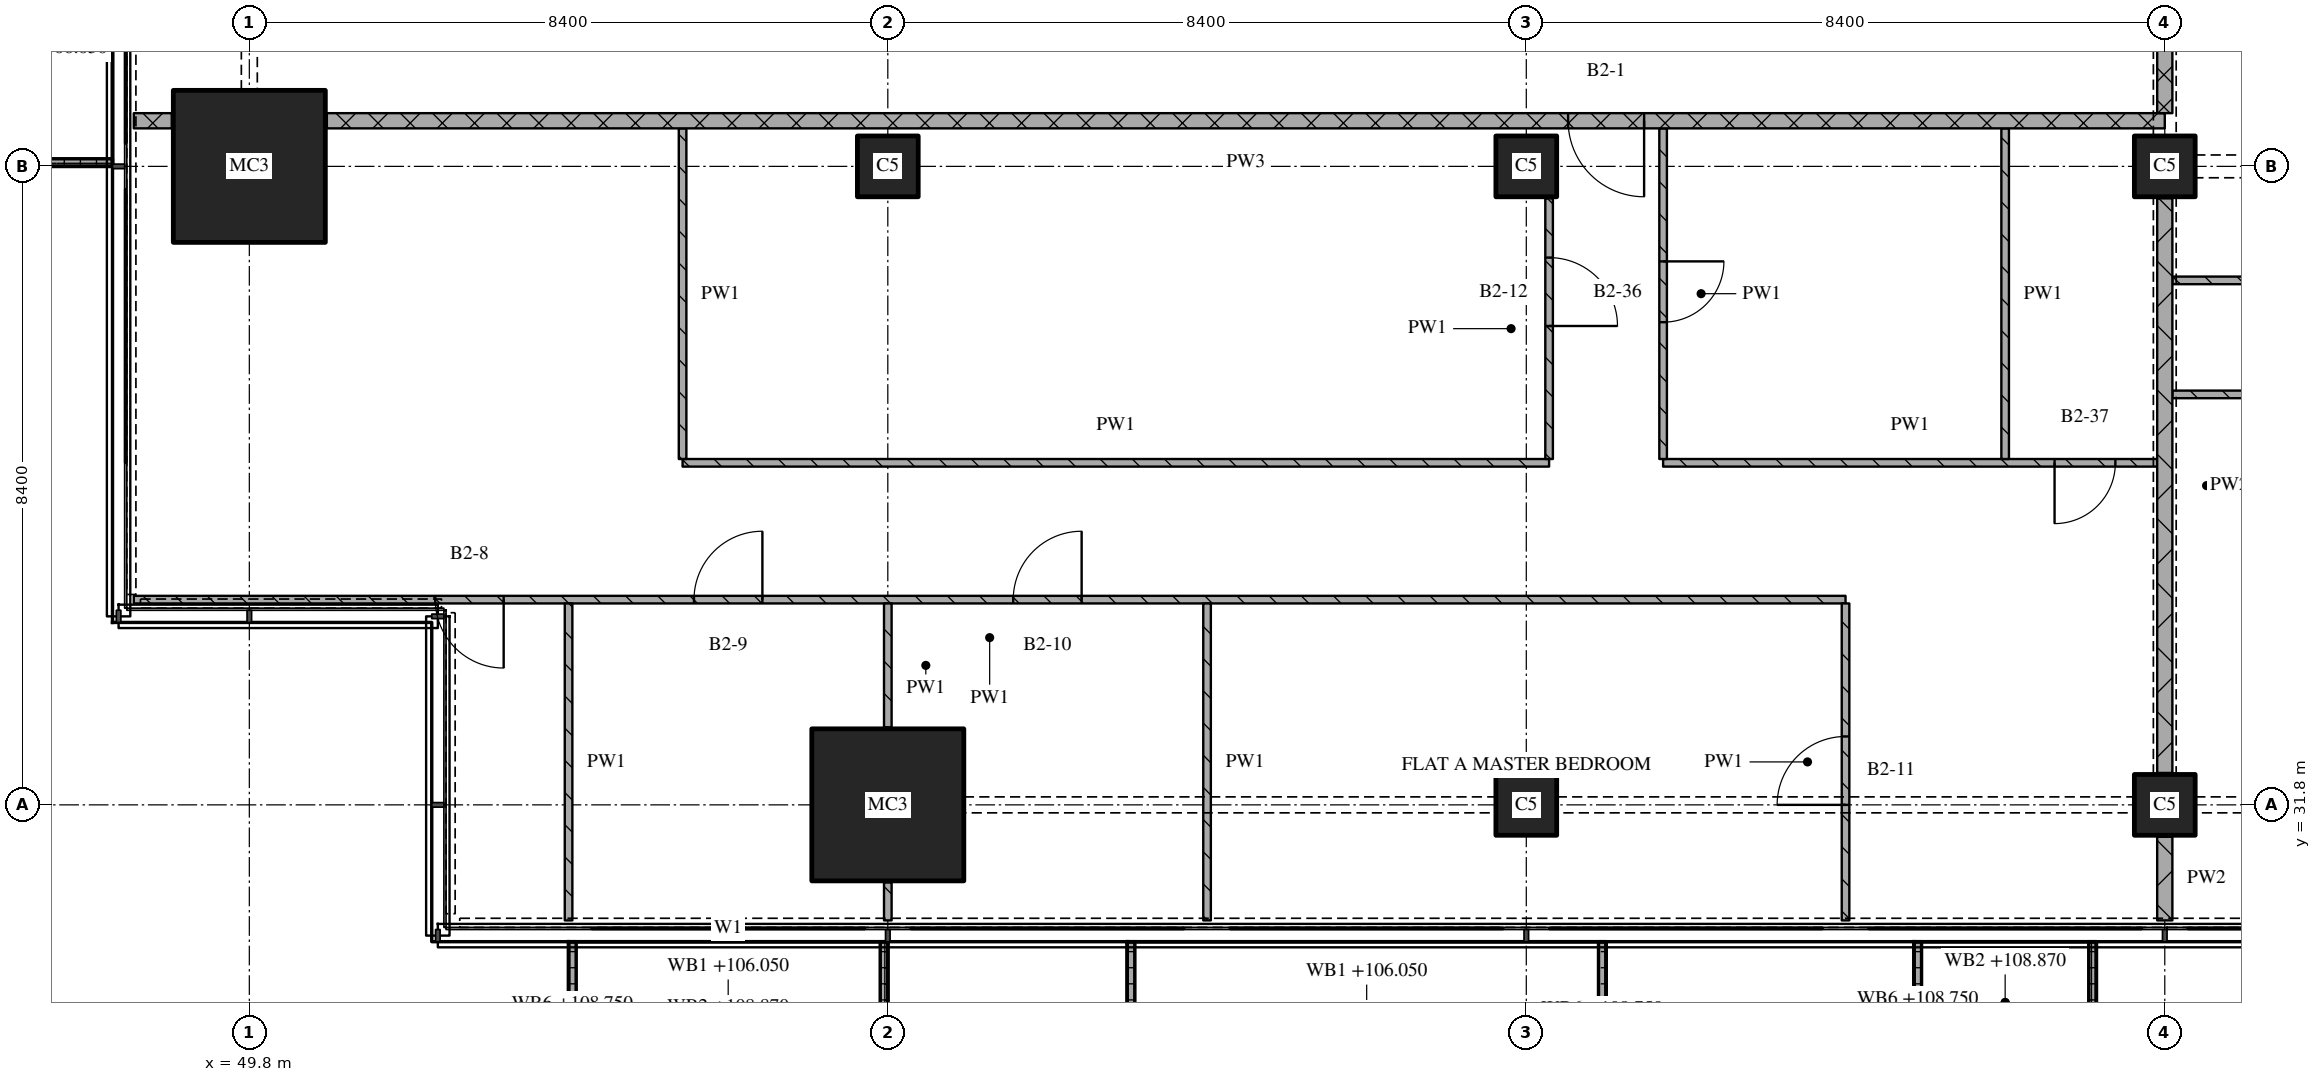
"""IFC4 building model, lengths in metres.
Left out: names, types, materials, properties, quantities, classifications, styles, units other than length and angle.
Written with IfcOpenShell. Run it as: python <this file> out.ifc"""

import sys

from ifc_helpers import new_model, si_unit, direction, frame, frame_2d, origin, origin_2d, place, context, subcontext, project, spatial, polyline, rectangle, outline, extrude, element, fill, save


model = new_model("IFC4")
c1 = context("Model", 3, precision=1e-05, world=origin(), true_north=direction((0.0, 1.0)))
c2 = subcontext(c1, "Body", "Model", "MODEL_VIEW")
j1 = project(units=[si_unit("LENGTHUNIT", "METRE"), si_unit("PLANEANGLEUNIT", "RADIAN")], contexts=[c1])
p1 = place(None, origin())
s1 = spatial("IfcSite", under=j1, at=p1, CompositionType="ELEMENT")
p2 = place(p1, origin())
s2 = spatial("IfcBuilding", under=s1, at=p2, CompositionType="ELEMENT")
p3 = place(p2, frame((0.0, 0.0, 106.05)))
s3 = spatial("IfcBuildingStorey", under=s2, at=p3, CompositionType="ELEMENT", Elevation=106.05)
for number, where, z_axis, x_axis in (
    (1, (49.8, 40.2, 0.0), (0.0, 0.0, 1.0), (1.0, 0.0, 0.0)),
    (2, (58.2, 31.8, 0.0), (0.0, 0.0, 1.0), (1.0, 0.0, 0.0)),
):
    element("IfcColumn", number, at=place(p3, frame(where, z_axis=z_axis, x_axis=x_axis)), inside=s3, PredefinedType="COLUMN", context=c2, shape_type="SweptSolid", body=[
        extrude(rectangle(XDim=2.0, YDim=2.0, at=origin_2d()), origin(), (0.0, 0.0, 1.0), 3.6),
    ])
for number, where, z_axis, x_axis in (
    (3, (58.2, 40.2, 0.0), (0.0, 0.0, 1.0), (1.0, 0.0, 0.0)),
    (4, (66.6, 31.8, 0.0), (0.0, 0.0, 1.0), (1.0, 0.0, 0.0)),
    (5, (66.6, 40.2, 0.0), (0.0, 0.0, 1.0), (1.0, 0.0, 0.0)),
    (6, (75.0, 31.8, 0.0), (0.0, 0.0, 1.0), (1.0, 0.0, 0.0)),
    (7, (75.0, 40.2, 0.0), (0.0, 0.0, 1.0), (1.0, 0.0, 0.0)),
):
    element("IfcColumn", number, at=place(p3, frame(where, z_axis=z_axis, x_axis=x_axis)), inside=s3, PredefinedType="COLUMN", context=c2, shape_type="SweptSolid", body=[
        extrude(rectangle(XDim=0.8, YDim=0.8, at=origin_2d()), origin(), (0.0, 0.0, 1.0), 3.6),
    ])
p4 = place(p3, origin())
e8 = element("IfcWall", 8, at=p4, inside=s3, PredefinedType="SOLIDWALL", context=c2, shape_type="SweptSolid", body=[
    extrude(outline(polyline([(54.0, 30.0), (54.1, 30.0), (54.1, 28.367), (58.1, 28.367), (58.1, 30.0), (58.2, 30.0), (58.2, 28.267), (54.0, 28.267), (54.0, 30.0)])), origin(), (0.0, 0.0, 1.0), 1.0),
])
p5 = place(p3, origin())
e9 = element("IfcWall", 9, at=p5, inside=s3, PredefinedType="SOLIDWALL", context=c2, shape_type="SweptSolid", body=[
    extrude(outline(polyline([(61.35, 30.0), (61.45, 30.0), (61.45, 28.233), (67.55, 28.233), (67.55, 30.0), (67.65, 30.0), (67.65, 28.133), (61.35, 28.133), (61.35, 30.0)])), origin(), (0.0, 0.0, 1.0), 1.0),
])
p6 = place(p3, origin())
e10 = element("IfcWall", 10, at=p6, inside=s3, PredefinedType="SOLIDWALL", context=c2, shape_type="SweptSolid", body=[
    extrude(outline(polyline([(71.7, 30.0), (71.8, 30.0), (71.8, 28.5), (74.0, 28.5), (74.0, 30.0), (74.1, 30.0), (74.1, 28.4), (71.7, 28.4), (71.7, 30.0)])), origin(), (0.0, 0.0, 1.0), 1.0),
])
p7 = place(p3, origin())
e11 = element("IfcWall", 11, at=p7, inside=s3, PredefinedType="SOLIDWALL", context=c2, shape_type="SweptSolid", body=[
    extrude(outline(polyline([(48.0, 44.4), (48.0, 44.3), (46.367, 44.3), (46.367, 40.3), (48.0, 40.3), (48.0, 40.2), (46.267, 40.2), (46.267, 44.4), (48.0, 44.4)])), origin(), (0.0, 0.0, 1.0), 1.0),
])
p8 = place(p3, frame((70.8, 34.5, 0.0), z_axis=(0.0, 0.0, 1.0), x_axis=(-1.0, 0.0, 0.0)))
e12 = element("IfcWall", 12, at=p8, inside=s3, PredefinedType="PARTITIONING", context=c2, shape_type="SweptSolid", body=[
    extrude(rectangle(XDim=22.52, YDim=0.1, at=frame_2d((11.26, 0.0))), origin(), (0.0, 0.0, 1.0), 3.32),
])
p9 = place(p8, frame((10.05, 0.0, 0.0)))
e13 = element("IfcOpeningElement", 13, at=p9, cuts=e12, PredefinedType="OPENING", context=c2, shape_type="SweptSolid", body=[
    extrude(rectangle(XDim=0.9, YDim=2.1, at=frame_2d((0.45, 1.05))), frame((0.0, 0.06, 0.0), z_axis=(0.0, -1.0, 0.0), x_axis=(1.0, 0.0, 0.0)), (0.0, 0.0, 1.0), 0.12),
])
p10 = place(p8, frame((14.25, 0.0, 0.0)))
e14 = element("IfcOpeningElement", 14, at=p10, cuts=e12, PredefinedType="OPENING", context=c2, shape_type="SweptSolid", body=[
    extrude(rectangle(XDim=0.9, YDim=2.1, at=frame_2d((0.45, 1.05))), frame((0.0, 0.06, 0.0), z_axis=(0.0, -1.0, 0.0), x_axis=(1.0, 0.0, 0.0)), (0.0, 0.0, 1.0), 0.12),
])
p11 = place(p8, frame((17.654, 0.0, 0.0)))
e15 = element("IfcOpeningElement", 15, at=p11, cuts=e12, PredefinedType="OPENING", context=c2, shape_type="SweptSolid", body=[
    extrude(rectangle(XDim=0.9, YDim=2.1, at=frame_2d((0.45, 1.05))), frame((0.0, 0.06, 0.0), z_axis=(0.0, -1.0, 0.0), x_axis=(1.0, 0.0, 0.0)), (0.0, 0.0, 1.0), 0.12),
])
p12 = place(p3, frame((55.5, 36.3, 0.0), z_axis=(0.0, 0.0, 1.0), x_axis=(1.0, 0.0, 0.0)))
e16 = element("IfcWall", 16, at=p12, inside=s3, PredefinedType="PARTITIONING", context=c2, shape_type="SweptSolid", body=[
    extrude(rectangle(XDim=11.4, YDim=0.1, at=frame_2d((5.7, 0.0))), origin(), (0.0, 0.0, 1.0), 3.32),
])
p13 = place(p3, frame((68.4, 36.3, 0.0), z_axis=(0.0, 0.0, 1.0), x_axis=(1.0, 0.0, 0.0)))
e17 = element("IfcWall", 17, at=p13, inside=s3, PredefinedType="PARTITIONING", context=c2, shape_type="SweptSolid", body=[
    extrude(rectangle(XDim=6.5, YDim=0.1, at=frame_2d((3.25, 0.0))), origin(), (0.0, 0.0, 1.0), 3.32),
])
p14 = place(p13, frame((5.15, 0.0, 0.0)))
e18 = element("IfcOpeningElement", 18, at=p14, cuts=e17, PredefinedType="OPENING", context=c2, shape_type="SweptSolid", body=[
    extrude(rectangle(XDim=0.8, YDim=2.1, at=frame_2d((0.4, 1.05))), frame((0.0, 0.06, 0.0), z_axis=(0.0, -1.0, 0.0), x_axis=(1.0, 0.0, 0.0)), (0.0, 0.0, 1.0), 0.12),
])
p15 = place(p3, frame((75.1, 37.2, 0.0), z_axis=(0.0, 0.0, 1.0), x_axis=(1.0, 0.0, 0.0)))
e19 = element("IfcWall", 19, at=p15, inside=s3, PredefinedType="PARTITIONING", context=c2, shape_type="SweptSolid", body=[
    extrude(rectangle(XDim=8.3, YDim=0.1, at=frame_2d((4.15, 0.0))), origin(), (0.0, 0.0, 1.0), 3.32),
])
p16 = place(p3, frame((75.1, 38.7, 0.0), z_axis=(0.0, 0.0, 1.0), x_axis=(1.0, 0.0, 0.0)))
e20 = element("IfcWall", 20, at=p16, inside=s3, PredefinedType="PARTITIONING", context=c2, shape_type="SweptSolid", body=[
    extrude(rectangle(XDim=11.0, YDim=0.1, at=frame_2d((5.5, 0.0))), origin(), (0.0, 0.0, 1.0), 3.32),
])
p17 = place(p16, frame((1.75, 0.0, 0.0)))
e21 = element("IfcOpeningElement", 21, at=p17, cuts=e20, PredefinedType="OPENING", context=c2, shape_type="SweptSolid", body=[
    extrude(rectangle(XDim=0.8, YDim=2.1, at=frame_2d((0.4, 1.05))), frame((0.0, 0.06, 0.0), z_axis=(0.0, -1.0, 0.0), x_axis=(1.0, 0.0, 0.0)), (0.0, 0.0, 1.0), 0.12),
])
p18 = place(p16, frame((6.25, 0.0, 0.0)))
e22 = element("IfcOpeningElement", 22, at=p18, cuts=e20, PredefinedType="OPENING", context=c2, shape_type="SweptSolid", body=[
    extrude(rectangle(XDim=0.8, YDim=2.1, at=frame_2d((0.4, 1.05))), frame((0.0, 0.06, 0.0), z_axis=(0.0, -1.0, 0.0), x_axis=(1.0, 0.0, 0.0)), (0.0, 0.0, 1.0), 0.12),
])
p19 = place(p3, frame((48.28, 40.8, 0.0), z_axis=(0.0, 0.0, 1.0), x_axis=(1.0, 0.0, 0.0)))
e23 = element("IfcWall", 23, at=p19, inside=s3, PredefinedType="PARTITIONING", context=c2, shape_type="SweptSolid", body=[
    extrude(rectangle(XDim=0.5, YDim=0.2, at=frame_2d((0.25, 0.0))), origin(), (0.0, 0.0, 1.0), 3.32),
])
p20 = place(p3, frame((75.0, 40.8, 0.0), z_axis=(0.0, 0.0, 1.0), x_axis=(-1.0, 0.0, 0.0)))
e24 = element("IfcWall", 24, at=p20, inside=s3, PredefinedType="PARTITIONING", context=c2, shape_type="SweptSolid", body=[
    extrude(rectangle(XDim=24.18, YDim=0.2, at=frame_2d((12.09, 0.0))), origin(), (0.0, 0.0, 1.0), 3.32),
])
p21 = place(p20, frame((6.85, 0.0, 0.0)))
e25 = element("IfcOpeningElement", 25, at=p21, cuts=e24, PredefinedType="OPENING", context=c2, shape_type="SweptSolid", body=[
    extrude(rectangle(XDim=1.0, YDim=2.1, at=frame_2d((0.5, 1.05))), frame((0.0, 0.11, 0.0), z_axis=(0.0, -1.0, 0.0), x_axis=(1.0, 0.0, 0.0)), (0.0, 0.0, 1.0), 0.22),
])
p22 = place(p3, frame((54.0, 34.45, 0.0), z_axis=(0.0, 0.0, 1.0), x_axis=(0.0, -1.0, 0.0)))
e26 = element("IfcWall", 26, at=p22, inside=s3, PredefinedType="PARTITIONING", context=c2, shape_type="SweptSolid", body=[
    extrude(rectangle(XDim=4.17, YDim=0.1, at=frame_2d((2.085, 0.0))), origin(), (0.0, 0.0, 1.0), 3.32),
])
p23 = place(p3, frame((55.5, 40.7, 0.0), z_axis=(0.0, 0.0, 1.0), x_axis=(0.0, -1.0, 0.0)))
e27 = element("IfcWall", 27, at=p23, inside=s3, PredefinedType="PARTITIONING", context=c2, shape_type="SweptSolid", body=[
    extrude(rectangle(XDim=4.35, YDim=0.1, at=frame_2d((2.175, 0.0))), origin(), (0.0, 0.0, 1.0), 3.32),
])
p24 = place(p3, frame((58.2, 30.78, 0.0), z_axis=(0.0, 0.0, 1.0), x_axis=(0.0, -1.0, 0.0)))
e28 = element("IfcWall", 28, at=p24, inside=s3, PredefinedType="PARTITIONING", context=c2, shape_type="SweptSolid", body=[
    extrude(rectangle(XDim=0.5, YDim=0.1, at=frame_2d((0.25, 0.0))), origin(), (0.0, 0.0, 1.0), 3.32),
])
p25 = place(p3, frame((58.2, 34.45, 0.0), z_axis=(0.0, 0.0, 1.0), x_axis=(0.0, -1.0, 0.0)))
e29 = element("IfcWall", 29, at=p25, inside=s3, PredefinedType="PARTITIONING", context=c2, shape_type="SweptSolid", body=[
    extrude(rectangle(XDim=1.63, YDim=0.1, at=frame_2d((0.815, 0.0))), origin(), (0.0, 0.0, 1.0), 3.32),
])
p26 = place(p3, frame((62.4, 34.45, 0.0), z_axis=(0.0, 0.0, 1.0), x_axis=(0.0, -1.0, 0.0)))
e30 = element("IfcWall", 30, at=p26, inside=s3, PredefinedType="PARTITIONING", context=c2, shape_type="SweptSolid", body=[
    extrude(rectangle(XDim=4.17, YDim=0.1, at=frame_2d((2.085, 0.0))), origin(), (0.0, 0.0, 1.0), 3.32),
])
p27 = place(p3, frame((66.9, 36.35, 0.0), z_axis=(0.0, 0.0, 1.0), x_axis=(0.0, 1.0, 0.0)))
e31 = element("IfcWall", 31, at=p27, inside=s3, PredefinedType="PARTITIONING", context=c2, shape_type="SweptSolid", body=[
    extrude(rectangle(XDim=3.43, YDim=0.1, at=frame_2d((1.715, 0.0))), origin(), (0.0, 0.0, 1.0), 3.32),
])
p28 = place(p27, frame((1.75, 0.0, 0.0)))
e32 = element("IfcOpeningElement", 32, at=p28, cuts=e31, PredefinedType="OPENING", context=c2, shape_type="SweptSolid", body=[
    extrude(rectangle(XDim=0.9, YDim=2.1, at=frame_2d((0.45, 1.05))), frame((0.0, 0.06, 0.0), z_axis=(0.0, -1.0, 0.0), x_axis=(1.0, 0.0, 0.0)), (0.0, 0.0, 1.0), 0.12),
])
p29 = place(p3, frame((68.4, 40.7, 0.0), z_axis=(0.0, 0.0, 1.0), x_axis=(0.0, -1.0, 0.0)))
e33 = element("IfcWall", 33, at=p29, inside=s3, PredefinedType="PARTITIONING", context=c2, shape_type="SweptSolid", body=[
    extrude(rectangle(XDim=4.35, YDim=0.1, at=frame_2d((2.175, 0.0))), origin(), (0.0, 0.0, 1.0), 3.32),
])
p30 = place(p29, frame((1.75, 0.0, 0.0)))
e34 = element("IfcOpeningElement", 34, at=p30, cuts=e33, PredefinedType="OPENING", context=c2, shape_type="SweptSolid", body=[
    extrude(rectangle(XDim=0.8, YDim=2.1, at=frame_2d((0.4, 1.05))), frame((0.0, 0.06, 0.0), z_axis=(0.0, -1.0, 0.0), x_axis=(1.0, 0.0, 0.0)), (0.0, 0.0, 1.0), 0.12),
])
p31 = place(p3, frame((70.8, 30.28, 0.0), z_axis=(0.0, 0.0, 1.0), x_axis=(0.0, 1.0, 0.0)))
e35 = element("IfcWall", 35, at=p31, inside=s3, PredefinedType="PARTITIONING", context=c2, shape_type="SweptSolid", body=[
    extrude(rectangle(XDim=4.17, YDim=0.1, at=frame_2d((2.085, 0.0))), origin(), (0.0, 0.0, 1.0), 3.32),
])
p32 = place(p31, frame((1.52, 0.0, 0.0)))
e36 = element("IfcOpeningElement", 36, at=p32, cuts=e35, PredefinedType="OPENING", context=c2, shape_type="SweptSolid", body=[
    extrude(rectangle(XDim=0.9, YDim=2.1, at=frame_2d((0.45, 1.05))), frame((0.0, 0.06, 0.0), z_axis=(0.0, -1.0, 0.0), x_axis=(1.0, 0.0, 0.0)), (0.0, 0.0, 1.0), 0.12),
])
p33 = place(p3, frame((72.9, 40.7, 0.0), z_axis=(0.0, 0.0, 1.0), x_axis=(0.0, -1.0, 0.0)))
e37 = element("IfcWall", 37, at=p33, inside=s3, PredefinedType="PARTITIONING", context=c2, shape_type="SweptSolid", body=[
    extrude(rectangle(XDim=4.35, YDim=0.1, at=frame_2d((2.175, 0.0))), origin(), (0.0, 0.0, 1.0), 3.32),
])
p34 = place(p3, frame((75.0, 43.1, 0.0), z_axis=(0.0, 0.0, 1.0), x_axis=(0.0, -1.0, 0.0)))
e38 = element("IfcWall", 38, at=p34, inside=s3, PredefinedType="PARTITIONING", context=c2, shape_type="SweptSolid", body=[
    extrude(rectangle(XDim=2.2, YDim=0.2, at=frame_2d((1.1, 0.0))), origin(), (0.0, 0.0, 1.0), 2.43),
])
p35 = place(p3, frame((75.0, 31.38, 0.0), z_axis=(0.0, 0.0, 1.0), x_axis=(0.0, -1.0, 0.0)))
e39 = element("IfcWall", 39, at=p35, inside=s3, PredefinedType="PARTITIONING", context=c2, shape_type="SweptSolid", body=[
    extrude(rectangle(XDim=1.1, YDim=0.2, at=frame_2d((0.55, 0.0))), origin(), (0.0, 0.0, 1.0), 3.32),
])
p36 = place(p3, frame((75.0, 39.78, 0.0), z_axis=(0.0, 0.0, 1.0), x_axis=(0.0, -1.0, 0.0)))
e40 = element("IfcWall", 40, at=p36, inside=s3, PredefinedType="PARTITIONING", context=c2, shape_type="SweptSolid", body=[
    extrude(rectangle(XDim=7.56, YDim=0.2, at=frame_2d((3.78, 0.0))), origin(), (0.0, 0.0, 1.0), 2.83),
])
p37 = place(p9, origin())
e41 = element("IfcDoor", 41, at=p37, inside=s3, OperationType="SINGLE_SWING_RIGHT", PredefinedType="DOOR", context=c2, shape_type="SweptSolid", body=[
    extrude(rectangle(XDim=0.9, YDim=2.1, at=frame_2d((0.45, 1.05))), frame((0.0, 0.025, 0.0), z_axis=(0.0, -1.0, 0.0), x_axis=(1.0, 0.0, 0.0)), (0.0, 0.0, 1.0), 0.05),
])
fill(e13, e41)
p38 = place(p10, origin())
e42 = element("IfcDoor", 42, at=p38, inside=s3, OperationType="SINGLE_SWING_RIGHT", PredefinedType="DOOR", context=c2, shape_type="SweptSolid", body=[
    extrude(rectangle(XDim=0.9, YDim=2.1, at=frame_2d((0.45, 1.05))), frame((0.0, 0.025, 0.0), z_axis=(0.0, -1.0, 0.0), x_axis=(1.0, 0.0, 0.0)), (0.0, 0.0, 1.0), 0.05),
])
fill(e14, e42)
p39 = place(p11, origin())
e43 = element("IfcDoor", 43, at=p39, inside=s3, OperationType="SINGLE_SWING_LEFT", PredefinedType="DOOR", context=c2, shape_type="SweptSolid", body=[
    extrude(rectangle(XDim=0.9, YDim=2.1, at=frame_2d((0.45, 1.05))), frame((0.0, 0.025, 0.0), z_axis=(0.0, -1.0, 0.0), x_axis=(1.0, 0.0, 0.0)), (0.0, 0.0, 1.0), 0.05),
])
fill(e15, e43)
p40 = place(p14, origin())
e44 = element("IfcDoor", 44, at=p40, inside=s3, OperationType="SINGLE_SWING_RIGHT", PredefinedType="DOOR", context=c2, shape_type="SweptSolid", body=[
    extrude(rectangle(XDim=0.8, YDim=2.1, at=frame_2d((0.4, 1.05))), frame((0.0, 0.025, 0.0), z_axis=(0.0, -1.0, 0.0), x_axis=(1.0, 0.0, 0.0)), (0.0, 0.0, 1.0), 0.05),
])
fill(e18, e44)
p41 = place(p21, origin())
e45 = element("IfcDoor", 45, at=p41, inside=s3, OperationType="SINGLE_SWING_LEFT", PredefinedType="DOOR", context=c2, shape_type="SweptSolid", body=[
    extrude(rectangle(XDim=1.0, YDim=2.1, at=frame_2d((0.5, 1.05))), frame((0.0, 0.025, 0.0), z_axis=(0.0, -1.0, 0.0), x_axis=(1.0, 0.0, 0.0)), (0.0, 0.0, 1.0), 0.05),
])
fill(e25, e45)
p42 = place(p28, origin())
e46 = element("IfcDoor", 46, at=p42, inside=s3, OperationType="SINGLE_SWING_RIGHT", PredefinedType="DOOR", context=c2, shape_type="SweptSolid", body=[
    extrude(rectangle(XDim=0.9, YDim=2.1, at=frame_2d((0.45, 1.05))), frame((0.0, 0.025, 0.0), z_axis=(0.0, -1.0, 0.0), x_axis=(1.0, 0.0, 0.0)), (0.0, 0.0, 1.0), 0.05),
])
fill(e32, e46)
p43 = place(p30, origin())
e47 = element("IfcDoor", 47, at=p43, inside=s3, OperationType="SINGLE_SWING_LEFT", PredefinedType="DOOR", context=c2, shape_type="SweptSolid", body=[
    extrude(rectangle(XDim=0.8, YDim=2.1, at=frame_2d((0.4, 1.05))), frame((0.0, 0.025, 0.0), z_axis=(0.0, -1.0, 0.0), x_axis=(1.0, 0.0, 0.0)), (0.0, 0.0, 1.0), 0.05),
])
fill(e34, e47)
p44 = place(p32, origin())
e48 = element("IfcDoor", 48, at=p44, inside=s3, OperationType="SINGLE_SWING_LEFT", PredefinedType="DOOR", context=c2, shape_type="SweptSolid", body=[
    extrude(rectangle(XDim=0.9, YDim=2.1, at=frame_2d((0.45, 1.05))), frame((0.0, 0.025, 0.0), z_axis=(0.0, -1.0, 0.0), x_axis=(1.0, 0.0, 0.0)), (0.0, 0.0, 1.0), 0.05),
])
fill(e36, e48)
save(model, sys.argv[1])
